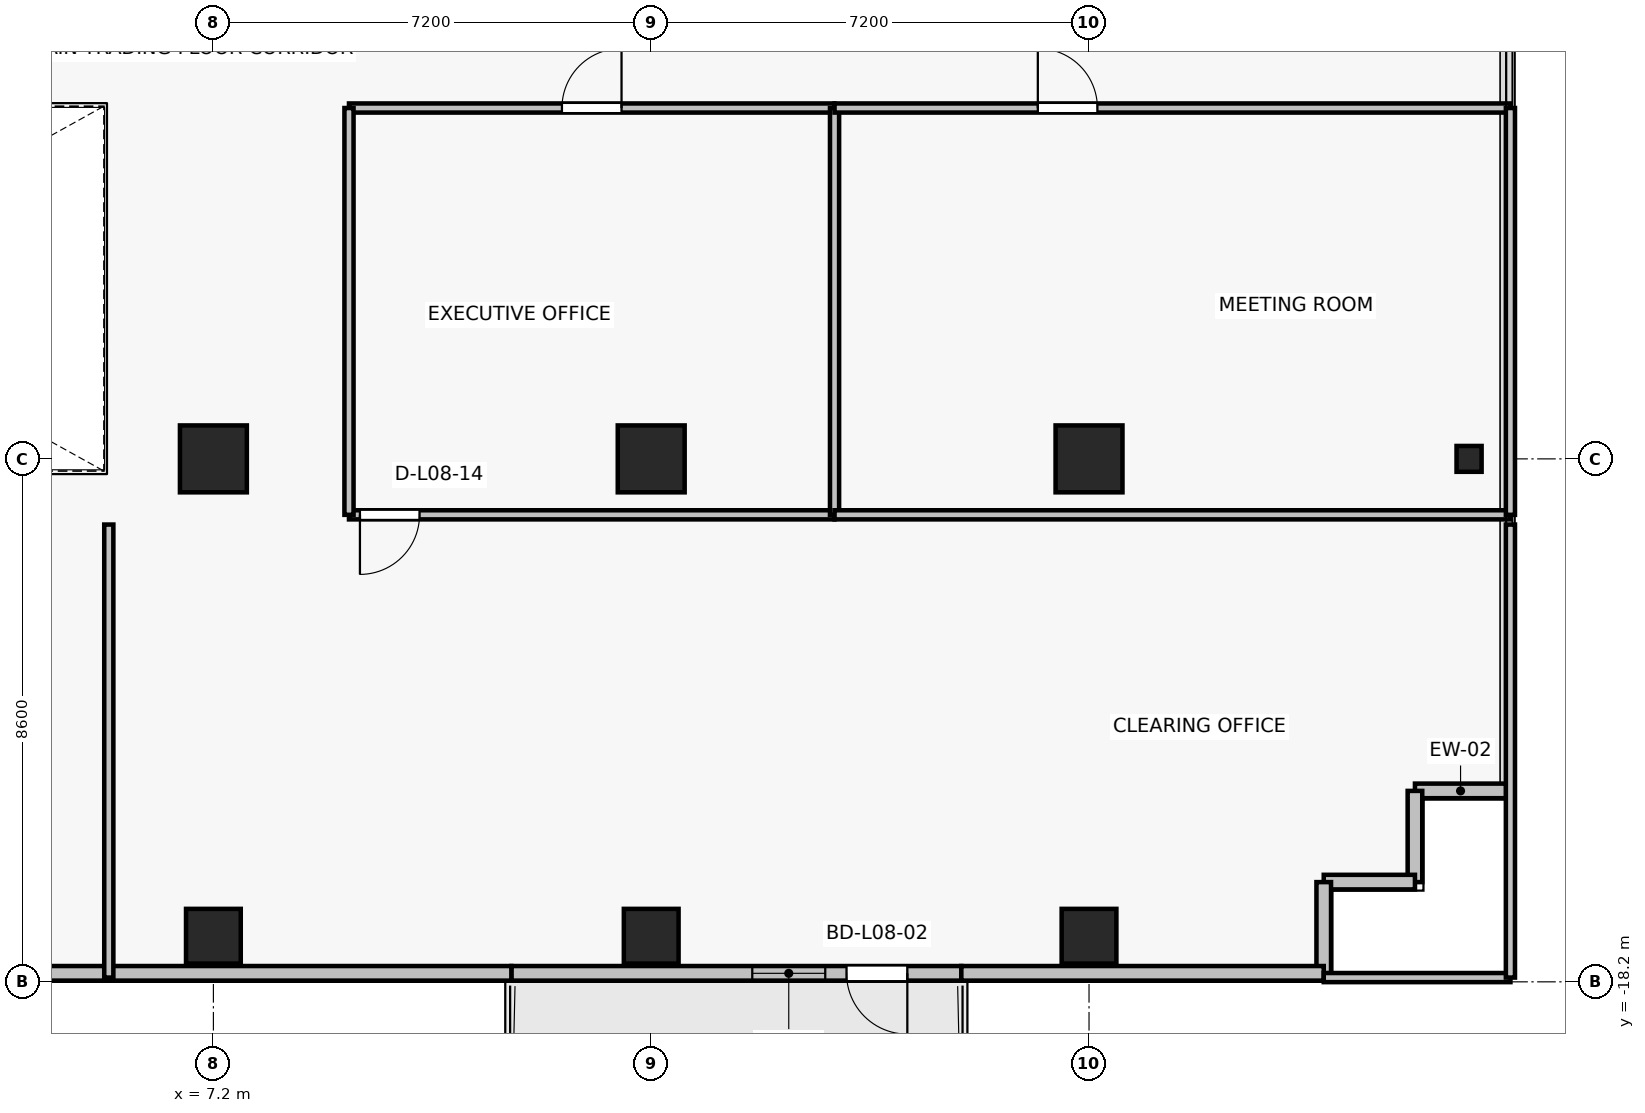
"""IFC4 building model, lengths in metres.
Left out: names, types, materials, properties, quantities, classifications, styles, units other than length and angle.
Written with IfcOpenShell. Run it as: python <this file> out.ifc"""

import sys

from ifc_helpers import new_model, si_unit, direction, frame, frame_2d, origin, origin_2d, place, context, subcontext, project, spatial, rectangle, i_section, extrude, source, transform, mapped, element, fill, save


model = new_model("IFC4")
c1 = context("Model", 3, precision=1e-05, world=origin(), true_north=direction((0.0, 1.0)))
c2 = subcontext(c1, "Body", "Model", "MODEL_VIEW")
j1 = project(units=[si_unit("LENGTHUNIT", "METRE"), si_unit("PLANEANGLEUNIT", "RADIAN")], contexts=[c1])
p1 = place(None, origin())
s1 = spatial("IfcSite", under=j1, at=p1, CompositionType="ELEMENT")
p2 = place(p1, origin())
s2 = spatial("IfcBuilding", under=s1, at=p2, CompositionType="ELEMENT")
p3 = place(p2, frame((0.0, 0.0, 34.0)))
s3 = spatial("IfcBuildingStorey", under=s2, at=p3, CompositionType="ELEMENT", Elevation=34.0)
for number, where, z_axis, x_axis in (
    (1, (7.2, -9.6, 0.0), (0.0, 0.0, 1.0), (1.0, 0.0, 0.0)),
    (2, (14.4, -9.6, 0.0), (0.0, 0.0, 1.0), (1.0, 0.0, 0.0)),
    (3, (21.6, -9.6, 0.0), (0.0, 0.0, 1.0), (1.0, 0.0, 0.0)),
):
    element("IfcColumn", number, at=place(p3, frame(where, z_axis=z_axis, x_axis=x_axis)), inside=s3, PredefinedType="COLUMN", context=c2, shape_type="SweptSolid", body=[
        extrude(rectangle(XDim=1.1, YDim=1.1, at=origin_2d()), origin(), (0.0, 0.0, 1.0), 3.3),
    ])
for number, where, z_axis, x_axis in (
    (4, (7.2, -17.45, 0.0), (0.0, 0.0, 1.0), (1.0, 0.0, 0.0)),
    (5, (14.4, -17.45, 0.0), (0.0, 0.0, 1.0), (1.0, 0.0, 0.0)),
    (6, (21.6, -17.45, 0.0), (0.0, 0.0, 1.0), (1.0, 0.0, 0.0)),
):
    element("IfcColumn", number, at=place(p3, frame(where, z_axis=z_axis, x_axis=x_axis)), inside=s3, PredefinedType="COLUMN", context=c2, shape_type="SweptSolid", body=[
        extrude(rectangle(XDim=0.9, YDim=0.9, at=origin_2d()), origin(), (0.0, 0.0, 1.0), 3.3),
    ])
p4 = place(p3, frame((27.85, -9.6, 0.0), z_axis=(0.0, 0.0, 1.0), x_axis=(1.0, 0.0, 0.0)))
e7 = element("IfcColumn", 7, at=p4, inside=s3, PredefinedType="COLUMN", context=c2, shape_type="SweptSolid", body=[
    extrude(i_section(OverallWidth=0.412, OverallDepth=0.425, WebThickness=0.026, FlangeThickness=0.039, FilletRadius=0.015, at=origin_2d()), origin(), (0.0, 0.0, 1.0), 3.3),
])
p5 = place(p3, frame((19.5, -18.06, 0.0), z_axis=(0.0, 0.0, 1.0), x_axis=(-1.0, 0.0, 0.0)))
e8 = element("IfcWall", 8, at=p5, inside=s3, PredefinedType="SOLIDWALL", context=c2, shape_type="SweptSolid", body=[
    extrude(rectangle(XDim=7.4, YDim=0.24, at=frame_2d((3.7, 0.0))), origin(), (0.0, 0.0, 1.0), 2.665),
])
p6 = place(p5, frame((0.888, 0.0, 0.0)))
e9 = element("IfcOpeningElement", 9, at=p6, cuts=e8, PredefinedType="OPENING", context=c2, shape_type="SweptSolid", body=[
    extrude(rectangle(XDim=1.0, YDim=2.2, at=frame_2d((0.5, 1.1))), frame((0.0, 0.13, 0.0), z_axis=(0.0, -1.0, 0.0), x_axis=(1.0, 0.0, 0.0)), (0.0, 0.0, 1.0), 0.26),
])
p7 = place(p5, frame((2.238, 0.0, 0.85)))
e10 = element("IfcOpeningElement", 10, at=p7, cuts=e8, PredefinedType="OPENING", context=c2, shape_type="SweptSolid", body=[
    extrude(rectangle(XDim=1.2, YDim=1.5, at=frame_2d((0.6, 0.75))), frame((0.0, 0.13, 0.0), z_axis=(0.0, -1.0, 0.0), x_axis=(1.0, 0.0, 0.0)), (0.0, 0.0, 1.0), 0.26),
])
for number, where, z_axis, x_axis in (
    (11, (26.96, -15.06, 0.0), (0.0, 0.0, 1.0), (1.0, 0.0, 0.0)),
    (12, (26.96, -16.56, 0.0), (0.0, 0.0, 1.0), (0.0, 1.0, 0.0)),
    (13, (25.46, -16.56, 0.0), (0.0, 0.0, 1.0), (1.0, 0.0, 0.0)),
    (14, (25.46, -18.06, 0.0), (0.0, 0.0, 1.0), (0.0, 1.0, 0.0)),
):
    element("IfcWall", number, at=place(p3, frame(where, z_axis=z_axis, x_axis=x_axis)), inside=s3, PredefinedType="SOLIDWALL", context=c2, shape_type="SweptSolid", body=[
        extrude(rectangle(XDim=1.5, YDim=0.24, at=frame_2d((0.75, 0.0))), origin(), (0.0, 0.0, 1.0), 3.075),
    ])
p8 = place(p3, frame((19.5, -18.06, 0.0), z_axis=(0.0, 0.0, 1.0), x_axis=(1.0, 0.0, 0.0)))
e15 = element("IfcWall", 15, at=p8, inside=s3, PredefinedType="SOLIDWALL", context=c2, shape_type="SweptSolid", body=[
    extrude(rectangle(XDim=5.96, YDim=0.24, at=frame_2d((2.98, 0.0))), origin(), (0.0, 0.0, 1.0), 2.665),
])
p9 = place(p3, frame((3.34, -18.06, 0.0), z_axis=(0.0, 0.0, 1.0), x_axis=(1.0, 0.0, 0.0)))
e16 = element("IfcWall", 16, at=p9, inside=s3, PredefinedType="SOLIDWALL", context=c2, shape_type="SweptSolid", body=[
    extrude(rectangle(XDim=8.76, YDim=0.24, at=frame_2d((4.38, 0.0))), origin(), (0.0, 0.0, 1.0), 3.075),
])
p10 = place(p3, frame((17.415, -10.52, 0.0), z_axis=(0.0, 0.0, 1.0), x_axis=(-1.0, 0.0, 0.0)))
e17 = element("IfcWall", 17, at=p10, inside=s3, PredefinedType="PARTITIONING", context=c2, shape_type="SweptSolid", body=[
    extrude(rectangle(XDim=7.985, YDim=0.15, at=frame_2d((3.993, 0.0))), origin(), (0.0, 0.0, 1.0), 2.465),
])
p11 = place(p10, frame((6.825, 0.0, 0.0)))
e18 = element("IfcOpeningElement", 18, at=p11, cuts=e17, PredefinedType="OPENING", context=c2, shape_type="SweptSolid", body=[
    extrude(rectangle(XDim=0.98, YDim=2.15, at=frame_2d((0.49, 1.075))), frame((0.0, 0.085, 0.0), z_axis=(0.0, -1.0, 0.0), x_axis=(1.0, 0.0, 0.0)), (0.0, 0.0, 1.0), 0.17),
])
p12 = place(p3, frame((9.43, -3.83, 0.0), z_axis=(0.0, 0.0, 1.0), x_axis=(1.0, 0.0, 0.0)))
e19 = element("IfcWall", 19, at=p12, inside=s3, PredefinedType="PARTITIONING", context=c2, shape_type="SweptSolid", body=[
    extrude(rectangle(XDim=7.985, YDim=0.15, at=frame_2d((3.993, 0.0))), origin(), (0.0, 0.0, 1.0), 2.465),
])
p13 = place(p12, frame((3.502, 0.0, 0.0)))
e20 = element("IfcOpeningElement", 20, at=p13, cuts=e19, PredefinedType="OPENING", context=c2, shape_type="SweptSolid", body=[
    extrude(rectangle(XDim=0.98, YDim=2.15, at=frame_2d((0.49, 1.075))), frame((0.0, 0.085, 0.0), z_axis=(0.0, -1.0, 0.0), x_axis=(1.0, 0.0, 0.0)), (0.0, 0.0, 1.0), 0.17),
])
for number, where, z_axis, x_axis in (
    (21, (9.43, -10.52, 0.0), (0.0, 0.0, 1.0), (0.0, 1.0, 0.0)),
    (22, (17.415, -3.83, 0.0), (0.0, 0.0, 1.0), (0.0, -1.0, 0.0)),
):
    element("IfcWall", number, at=place(p3, frame(where, z_axis=z_axis, x_axis=x_axis)), inside=s3, PredefinedType="PARTITIONING", context=c2, shape_type="SweptSolid", body=[
        extrude(rectangle(XDim=6.69, YDim=0.15, at=frame_2d((3.345, 0.0))), origin(), (0.0, 0.0, 1.0), 2.465),
    ])
p14 = place(p3, frame((28.53, -10.52, 0.0), z_axis=(0.0, 0.0, 1.0), x_axis=(-1.0, 0.0, 0.0)))
e23 = element("IfcWall", 23, at=p14, inside=s3, PredefinedType="PARTITIONING", context=c2, shape_type="SweptSolid", body=[
    extrude(rectangle(XDim=11.115, YDim=0.15, at=frame_2d((5.558, 0.0))), origin(), (0.0, 0.0, 1.0), 2.465),
])
p15 = place(p3, frame((17.415, -3.83, 0.0), z_axis=(0.0, 0.0, 1.0), x_axis=(1.0, 0.0, 0.0)))
e24 = element("IfcWall", 24, at=p15, inside=s3, PredefinedType="PARTITIONING", context=c2, shape_type="SweptSolid", body=[
    extrude(rectangle(XDim=11.115, YDim=0.15, at=frame_2d((5.558, 0.0))), origin(), (0.0, 0.0, 1.0), 2.465),
])
p16 = place(p15, frame((3.343, 0.0, 0.0)))
e25 = element("IfcOpeningElement", 25, at=p16, cuts=e24, PredefinedType="OPENING", context=c2, shape_type="SweptSolid", body=[
    extrude(rectangle(XDim=0.98, YDim=2.15, at=frame_2d((0.49, 1.075))), frame((0.0, 0.085, 0.0), z_axis=(0.0, -1.0, 0.0), x_axis=(1.0, 0.0, 0.0)), (0.0, 0.0, 1.0), 0.17),
])
p17 = place(p3, frame((28.53, -3.83, 0.0), z_axis=(0.0, 0.0, 1.0), x_axis=(0.0, -1.0, 0.0)))
e26 = element("IfcWall", 26, at=p17, inside=s3, PredefinedType="PARTITIONING", context=c2, shape_type="SweptSolid", body=[
    extrude(rectangle(XDim=6.69, YDim=0.15, at=frame_2d((3.345, 0.0))), origin(), (0.0, 0.0, 1.0), 2.665),
])
p18 = place(p3, frame((28.53, -18.13, 0.0), z_axis=(0.0, 0.0, 1.0), x_axis=(-1.0, 0.0, 0.0)))
e27 = element("IfcWall", 27, at=p18, inside=s3, PredefinedType="PARTITIONING", context=c2, shape_type="SweptSolid", body=[
    extrude(rectangle(XDim=3.07, YDim=0.15, at=frame_2d((1.535, 0.0))), origin(), (0.0, 0.0, 1.0), 2.665),
])
p19 = place(p3, frame((5.48, -18.13, 0.0), z_axis=(0.0, 0.0, 1.0), x_axis=(0.0, 1.0, 0.0)))
e28 = element("IfcWall", 28, at=p19, inside=s3, PredefinedType="PARTITIONING", context=c2, shape_type="SweptSolid", body=[
    extrude(rectangle(XDim=7.45, YDim=0.15, at=frame_2d((3.725, 0.0))), origin(), (0.0, 0.0, 1.0), 2.465),
])
p20 = place(p3, frame((28.53, -10.68, 0.0), z_axis=(0.0, 0.0, 1.0), x_axis=(0.0, -1.0, 0.0)))
e29 = element("IfcWall", 29, at=p20, inside=s3, PredefinedType="PARTITIONING", context=c2, shape_type="SweptSolid", body=[
    extrude(rectangle(XDim=7.45, YDim=0.15, at=frame_2d((3.725, 0.0))), origin(), (0.0, 0.0, 1.0), 3.075),
])
m1 = source(origin(), c2, "Body", "SweptSolid", [
    extrude(rectangle(XDim=1.0, YDim=2.2, at=frame_2d((0.5, 1.1))), frame((0.0, 0.025, 0.0), z_axis=(0.0, -1.0, 0.0), x_axis=(1.0, 0.0, 0.0)), (0.0, 0.0, 1.0), 0.05),
])
p21 = place(p6, origin())
e30 = element("IfcDoor", 30, at=p21, inside=s3, OperationType="SINGLE_SWING_LEFT", PredefinedType="DOOR", context=c2, shape_type="MappedRepresentation", body=[
    mapped(m1, transform((0.0, 0.0, 0.0), x_axis=(1.0, 0.0, 0.0), y_axis=(0.0, 1.0, 0.0), z_axis=(0.0, 0.0, 1.0), scale=1.0)),
])
fill(e9, e30)
m2 = source(origin(), c2, "Body", "SweptSolid", [
    extrude(rectangle(XDim=1.2, YDim=1.5, at=frame_2d((0.6, 0.75))), frame((0.0, 0.03, 0.0), z_axis=(0.0, -1.0, 0.0), x_axis=(1.0, 0.0, 0.0)), (0.0, 0.0, 1.0), 0.06),
])
p22 = place(p7, origin())
e31 = element("IfcWindow", 31, at=p22, inside=s3, PartitioningType="SINGLE_PANEL", PredefinedType="WINDOW", context=c2, shape_type="MappedRepresentation", body=[
    mapped(m2, transform((0.0, 0.0, 0.0), x_axis=(1.0, 0.0, 0.0), y_axis=(0.0, 1.0, 0.0), z_axis=(0.0, 0.0, 1.0), scale=1.0)),
])
fill(e10, e31)
m3 = source(origin(), c2, "Body", "SweptSolid", [
    extrude(rectangle(XDim=0.98, YDim=2.15, at=frame_2d((0.49, 1.075))), frame((0.0, 0.025, 0.0), z_axis=(0.0, -1.0, 0.0), x_axis=(1.0, 0.0, 0.0)), (0.0, 0.0, 1.0), 0.05),
])
p23 = place(p13, origin())
e32 = element("IfcDoor", 32, at=p23, inside=s3, OperationType="SINGLE_SWING_RIGHT", PredefinedType="DOOR", context=c2, shape_type="MappedRepresentation", body=[
    mapped(m3, transform((0.0, 0.0, 0.0), x_axis=(1.0, 0.0, 0.0), y_axis=(0.0, 1.0, 0.0), z_axis=(0.0, 0.0, 1.0), scale=1.0)),
])
fill(e20, e32)
p24 = place(p16, origin())
e33 = element("IfcDoor", 33, at=p24, inside=s3, OperationType="SINGLE_SWING_LEFT", PredefinedType="DOOR", context=c2, shape_type="MappedRepresentation", body=[
    mapped(m3, transform((0.0, 0.0, 0.0), x_axis=(1.0, 0.0, 0.0), y_axis=(0.0, 1.0, 0.0), z_axis=(0.0, 0.0, 1.0), scale=1.0)),
])
fill(e25, e33)
p25 = place(p11, origin())
e34 = element("IfcDoor", 34, at=p25, inside=s3, OperationType="SINGLE_SWING_RIGHT", PredefinedType="DOOR", context=c2, shape_type="MappedRepresentation", body=[
    mapped(m3, transform((0.0, 0.0, 0.0), x_axis=(1.0, 0.0, 0.0), y_axis=(0.0, 1.0, 0.0), z_axis=(0.0, 0.0, 1.0), scale=1.0)),
])
fill(e18, e34)
save(model, sys.argv[1])
